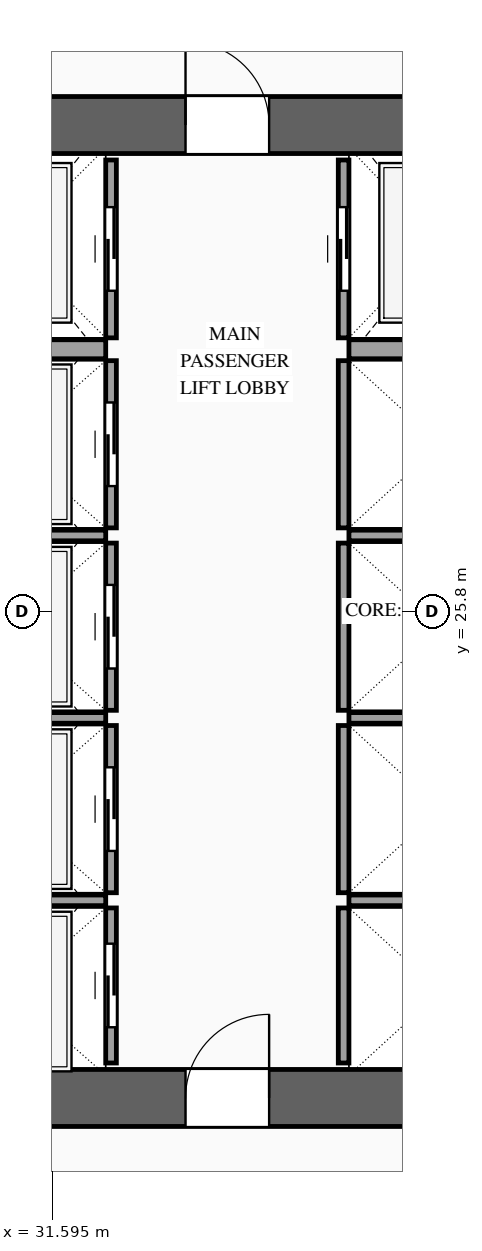
"""IFC4 building model, lengths in metres.
Left out: names, types, materials, properties, quantities, classifications, styles, units other than length and angle.
Written with IfcOpenShell. Run it as: python <this file> out.ifc"""

import sys

from ifc_helpers import new_model, si_unit, direction, frame, frame_2d, origin, place, context, subcontext, project, spatial, rectangle, extrude, source, transform, mapped, element, fill, save


model = new_model("IFC4")
c1 = context("Model", 3, precision=1e-05, world=origin(), true_north=direction((0.0, 1.0)))
c2 = subcontext(c1, "Body", "Model", "MODEL_VIEW")
j1 = project(units=[si_unit("LENGTHUNIT", "METRE"), si_unit("PLANEANGLEUNIT", "RADIAN")], contexts=[c1])
p1 = place(None, origin())
s1 = spatial("IfcSite", under=j1, at=p1, CompositionType="ELEMENT")
p2 = place(p1, origin())
s2 = spatial("IfcBuilding", under=s1, at=p2, CompositionType="ELEMENT")
p3 = place(p2, frame((0.0, 0.0, 126.2)))
s3 = spatial("IfcBuildingStorey", under=s2, at=p3, CompositionType="ELEMENT", Elevation=126.2)
p4 = place(p3, frame((23.425, 19.4, 0.0), z_axis=(0.0, 0.0, 1.0), x_axis=(1.0, 0.0, 0.0)))
e1 = element("IfcWall", 1, at=p4, inside=s3, PredefinedType="SHEAR", context=c2, shape_type="SweptSolid", body=[
    extrude(rectangle(XDim=27.15, YDim=0.75, at=frame_2d((13.575, 0.0))), origin(), (0.0, 0.0, 1.0), 3.6),
])
p5 = place(p4, frame((2.025, 0.0, 0.0)))
e2 = element("IfcOpeningElement", 2, at=p5, cuts=e1, PredefinedType="OPENING", context=c2, shape_type="SweptSolid", body=[
    extrude(rectangle(XDim=1.1, YDim=2.2, at=frame_2d((0.55, 1.1))), frame((0.0, 0.39, 0.0), z_axis=(0.0, -1.0, 0.0), x_axis=(1.0, 0.0, 0.0)), (0.0, 0.0, 1.0), 0.78),
])
p6 = place(p4, frame((9.925, 0.0, 0.0)))
e3 = element("IfcOpeningElement", 3, at=p6, cuts=e1, PredefinedType="OPENING", context=c2, shape_type="SweptSolid", body=[
    extrude(rectangle(XDim=1.1, YDim=2.2, at=frame_2d((0.55, 1.1))), frame((0.0, 0.39, 0.0), z_axis=(0.0, -1.0, 0.0), x_axis=(1.0, 0.0, 0.0)), (0.0, 0.0, 1.0), 0.78),
])
p7 = place(p4, frame((23.125, 0.0, 0.0)))
e4 = element("IfcOpeningElement", 4, at=p7, cuts=e1, PredefinedType="OPENING", context=c2, shape_type="SweptSolid", body=[
    extrude(rectangle(XDim=1.1, YDim=2.2, at=frame_2d((0.55, 1.1))), frame((0.0, 0.39, 0.0), z_axis=(0.0, -1.0, 0.0), x_axis=(1.0, 0.0, 0.0)), (0.0, 0.0, 1.0), 0.78),
])
p8 = place(p4, frame((19.745, 0.0, 0.0)))
e5 = element("IfcOpeningElement", 5, at=p8, cuts=e1, PredefinedType="OPENING", context=c2, shape_type="SweptSolid", body=[
    extrude(rectangle(XDim=0.9, YDim=2.15, at=frame_2d((0.45, 1.075))), frame((0.0, 0.39, 0.0), z_axis=(0.0, -1.0, 0.0), x_axis=(1.0, 0.0, 0.0)), (0.0, 0.0, 1.0), 0.78),
])
p9 = place(p4, frame((18.305, 0.0, 0.0)))
e6 = element("IfcOpeningElement", 6, at=p9, cuts=e1, PredefinedType="OPENING", context=c2, shape_type="SweptSolid", body=[
    extrude(rectangle(XDim=0.9, YDim=2.15, at=frame_2d((0.45, 1.075))), frame((0.0, 0.39, 0.0), z_axis=(0.0, -1.0, 0.0), x_axis=(1.0, 0.0, 0.0)), (0.0, 0.0, 1.0), 0.78),
])
p10 = place(p3, frame((23.425, 32.2, 0.0), z_axis=(0.0, 0.0, 1.0), x_axis=(1.0, 0.0, 0.0)))
e7 = element("IfcWall", 7, at=p10, inside=s3, PredefinedType="SHEAR", context=c2, shape_type="SweptSolid", body=[
    extrude(rectangle(XDim=27.15, YDim=0.75, at=frame_2d((13.575, 0.0))), origin(), (0.0, 0.0, 1.0), 3.6),
])
p11 = place(p10, frame((4.645, 0.0, 0.0)))
e8 = element("IfcOpeningElement", 8, at=p11, cuts=e7, PredefinedType="OPENING", context=c2, shape_type="SweptSolid", body=[
    extrude(rectangle(XDim=0.9, YDim=2.15, at=frame_2d((0.45, 1.075))), frame((0.0, 0.39, 0.0), z_axis=(0.0, -1.0, 0.0), x_axis=(1.0, 0.0, 0.0)), (0.0, 0.0, 1.0), 0.78),
])
p12 = place(p10, frame((9.925, 0.0, 0.0)))
e9 = element("IfcOpeningElement", 9, at=p12, cuts=e7, PredefinedType="OPENING", context=c2, shape_type="SweptSolid", body=[
    extrude(rectangle(XDim=1.1, YDim=2.2, at=frame_2d((0.55, 1.1))), frame((0.0, 0.39, 0.0), z_axis=(0.0, -1.0, 0.0), x_axis=(1.0, 0.0, 0.0)), (0.0, 0.0, 1.0), 0.78),
])
p13 = place(p10, frame((15.775, 0.0, 0.0)))
e10 = element("IfcOpeningElement", 10, at=p13, cuts=e7, PredefinedType="OPENING", context=c2, shape_type="SweptSolid", body=[
    extrude(rectangle(XDim=1.1, YDim=2.2, at=frame_2d((0.55, 1.1))), frame((0.0, 0.39, 0.0), z_axis=(0.0, -1.0, 0.0), x_axis=(1.0, 0.0, 0.0)), (0.0, 0.0, 1.0), 0.78),
])
p14 = place(p3, frame((32.37, 19.86, 0.0), z_axis=(0.0, 0.0, 1.0), x_axis=(0.0, 1.0, 0.0)))
e11 = element("IfcWall", 11, at=p14, inside=s3, PredefinedType="SOLIDWALL", context=c2, shape_type="SweptSolid", body=[
    extrude(rectangle(XDim=2.04, YDim=0.14, at=frame_2d((1.02, 0.0))), origin(), (0.0, 0.0, 1.0), 3.32),
])
p15 = place(p14, frame((0.47, 0.0, 0.0)))
e12 = element("IfcOpeningElement", 12, at=p15, cuts=e11, PredefinedType="OPENING", context=c2, shape_type="SweptSolid", body=[
    extrude(rectangle(XDim=1.1, YDim=2.2, at=frame_2d((0.55, 1.1))), frame((0.0, 0.085, 0.0), z_axis=(0.0, -1.0, 0.0), x_axis=(1.0, 0.0, 0.0)), (0.0, 0.0, 1.0), 0.17),
])
m1 = source(origin(), c2, "Body", "SweptSolid", [
    extrude(rectangle(XDim=2.5, YDim=0.14, at=frame_2d((1.25, 0.0))), origin(), (0.0, 0.0, 1.0), 3.32),
])
p16 = place(p3, frame((29.8, 22.0, 0.0), z_axis=(0.0, 0.0, 1.0), x_axis=(1.0, 0.0, 0.0)))
e13 = element("IfcWall", 13, at=p16, inside=s3, PredefinedType="SOLIDWALL", context=c2, shape_type="MappedRepresentation", body=[
    mapped(m1, transform((0.0, 0.0, 0.0), scale=1.0)),
])
p17 = place(p3, frame((32.37, 22.1, 0.0), z_axis=(0.0, 0.0, 1.0), x_axis=(0.0, 1.0, 0.0)))
e14 = element("IfcWall", 14, at=p17, inside=s3, PredefinedType="SOLIDWALL", context=c2, shape_type="SweptSolid", body=[
    extrude(rectangle(XDim=2.2, YDim=0.14, at=frame_2d((1.1, 0.0))), origin(), (0.0, 0.0, 1.0), 3.32),
])
p18 = place(p17, frame((0.55, 0.0, 0.0)))
e15 = element("IfcOpeningElement", 15, at=p18, cuts=e14, PredefinedType="OPENING", context=c2, shape_type="SweptSolid", body=[
    extrude(rectangle(XDim=1.1, YDim=2.2, at=frame_2d((0.55, 1.1))), frame((0.0, 0.085, 0.0), z_axis=(0.0, -1.0, 0.0), x_axis=(1.0, 0.0, 0.0)), (0.0, 0.0, 1.0), 0.17),
])
p19 = place(p3, frame((29.8, 24.4, 0.0), z_axis=(0.0, 0.0, 1.0), x_axis=(1.0, 0.0, 0.0)))
e16 = element("IfcWall", 16, at=p19, inside=s3, PredefinedType="SOLIDWALL", context=c2, shape_type="MappedRepresentation", body=[
    mapped(m1, transform((0.0, 0.0, 0.0), scale=1.0)),
])
p20 = place(p3, frame((32.37, 24.5, 0.0), z_axis=(0.0, 0.0, 1.0), x_axis=(0.0, 1.0, 0.0)))
e17 = element("IfcWall", 17, at=p20, inside=s3, PredefinedType="SOLIDWALL", context=c2, shape_type="SweptSolid", body=[
    extrude(rectangle(XDim=2.2, YDim=0.14, at=frame_2d((1.1, 0.0))), origin(), (0.0, 0.0, 1.0), 3.32),
])
p21 = place(p20, frame((0.55, 0.0, 0.0)))
e18 = element("IfcOpeningElement", 18, at=p21, cuts=e17, PredefinedType="OPENING", context=c2, shape_type="SweptSolid", body=[
    extrude(rectangle(XDim=1.1, YDim=2.2, at=frame_2d((0.55, 1.1))), frame((0.0, 0.085, 0.0), z_axis=(0.0, -1.0, 0.0), x_axis=(1.0, 0.0, 0.0)), (0.0, 0.0, 1.0), 0.17),
])
p22 = place(p3, frame((29.8, 26.8, 0.0), z_axis=(0.0, 0.0, 1.0), x_axis=(1.0, 0.0, 0.0)))
e19 = element("IfcWall", 19, at=p22, inside=s3, PredefinedType="SOLIDWALL", context=c2, shape_type="MappedRepresentation", body=[
    mapped(m1, transform((0.0, 0.0, 0.0), scale=1.0)),
])
p23 = place(p3, frame((32.37, 26.9, 0.0), z_axis=(0.0, 0.0, 1.0), x_axis=(0.0, 1.0, 0.0)))
e20 = element("IfcWall", 20, at=p23, inside=s3, PredefinedType="SOLIDWALL", context=c2, shape_type="SweptSolid", body=[
    extrude(rectangle(XDim=2.2, YDim=0.14, at=frame_2d((1.1, 0.0))), origin(), (0.0, 0.0, 1.0), 3.32),
])
p24 = place(p23, frame((0.55, 0.0, 0.0)))
e21 = element("IfcOpeningElement", 21, at=p24, cuts=e20, PredefinedType="OPENING", context=c2, shape_type="SweptSolid", body=[
    extrude(rectangle(XDim=1.1, YDim=2.2, at=frame_2d((0.55, 1.1))), frame((0.0, 0.085, 0.0), z_axis=(0.0, -1.0, 0.0), x_axis=(1.0, 0.0, 0.0)), (0.0, 0.0, 1.0), 0.17),
])
p25 = place(p3, frame((32.37, 29.4, 0.0), z_axis=(0.0, 0.0, 1.0), x_axis=(0.0, 1.0, 0.0)))
e22 = element("IfcWall", 22, at=p25, inside=s3, PredefinedType="SOLIDWALL", context=c2, shape_type="SweptSolid", body=[
    extrude(rectangle(XDim=2.34, YDim=0.14, at=frame_2d((1.17, 0.0))), origin(), (0.0, 0.0, 1.0), 3.32),
])
p26 = place(p25, frame((0.62, 0.0, 0.0)))
e23 = element("IfcOpeningElement", 23, at=p26, cuts=e22, PredefinedType="OPENING", context=c2, shape_type="SweptSolid", body=[
    extrude(rectangle(XDim=1.1, YDim=2.2, at=frame_2d((0.55, 1.1))), frame((0.0, 0.085, 0.0), z_axis=(0.0, -1.0, 0.0), x_axis=(1.0, 0.0, 0.0)), (0.0, 0.0, 1.0), 0.17),
])
m2 = source(origin(), c2, "Body", "SweptSolid", [
    extrude(rectangle(XDim=2.5, YDim=0.25, at=frame_2d((1.25, 0.0))), origin(), (0.0, 0.0, 1.0), 3.32),
])
p27 = place(p3, frame((29.8, 29.25, 0.0), z_axis=(0.0, 0.0, 1.0), x_axis=(1.0, 0.0, 0.0)))
e24 = element("IfcWall", 24, at=p27, inside=s3, PredefinedType="SOLIDWALL", context=c2, shape_type="MappedRepresentation", body=[
    mapped(m2, transform((0.0, 0.0, 0.0), scale=1.0)),
])
m3 = source(origin(), c2, "Body", "SweptSolid", [
    extrude(rectangle(XDim=2.04, YDim=0.14, at=frame_2d((1.02, 0.0))), origin(), (0.0, 0.0, 1.0), 3.32),
])
p28 = place(p3, frame((35.43, 19.86, 0.0), z_axis=(0.0, 0.0, 1.0), x_axis=(0.0, 1.0, 0.0)))
e25 = element("IfcWall", 25, at=p28, inside=s3, PredefinedType="SOLIDWALL", context=c2, shape_type="MappedRepresentation", body=[
    mapped(m3, transform((0.0, 0.0, 0.0), scale=1.0)),
])
m4 = source(origin(), c2, "Body", "SweptSolid", [
    extrude(rectangle(XDim=2.4, YDim=0.14, at=frame_2d((1.2, 0.0))), origin(), (0.0, 0.0, 1.0), 3.32),
])
p29 = place(p3, frame((35.5, 22.0, 0.0), z_axis=(0.0, 0.0, 1.0), x_axis=(1.0, 0.0, 0.0)))
e26 = element("IfcWall", 26, at=p29, inside=s3, PredefinedType="SOLIDWALL", context=c2, shape_type="MappedRepresentation", body=[
    mapped(m4, transform((0.0, 0.0, 0.0), scale=1.0)),
])
m5 = source(origin(), c2, "Body", "SweptSolid", [
    extrude(rectangle(XDim=2.2, YDim=0.14, at=frame_2d((1.1, 0.0))), origin(), (0.0, 0.0, 1.0), 3.32),
])
p30 = place(p3, frame((35.43, 22.1, 0.0), z_axis=(0.0, 0.0, 1.0), x_axis=(0.0, 1.0, 0.0)))
e27 = element("IfcWall", 27, at=p30, inside=s3, PredefinedType="SOLIDWALL", context=c2, shape_type="MappedRepresentation", body=[
    mapped(m5, transform((0.0, 0.0, 0.0), scale=1.0)),
])
p31 = place(p3, frame((35.5, 24.4, 0.0), z_axis=(0.0, 0.0, 1.0), x_axis=(1.0, 0.0, 0.0)))
e28 = element("IfcWall", 28, at=p31, inside=s3, PredefinedType="SOLIDWALL", context=c2, shape_type="MappedRepresentation", body=[
    mapped(m4, transform((0.0, 0.0, 0.0), scale=1.0)),
])
p32 = place(p3, frame((35.43, 24.5, 0.0), z_axis=(0.0, 0.0, 1.0), x_axis=(0.0, 1.0, 0.0)))
e29 = element("IfcWall", 29, at=p32, inside=s3, PredefinedType="SOLIDWALL", context=c2, shape_type="MappedRepresentation", body=[
    mapped(m5, transform((0.0, 0.0, 0.0), scale=1.0)),
])
p33 = place(p3, frame((35.5, 26.8, 0.0), z_axis=(0.0, 0.0, 1.0), x_axis=(1.0, 0.0, 0.0)))
e30 = element("IfcWall", 30, at=p33, inside=s3, PredefinedType="SOLIDWALL", context=c2, shape_type="MappedRepresentation", body=[
    mapped(m4, transform((0.0, 0.0, 0.0), scale=1.0)),
])
m6 = source(origin(), c2, "Body", "SweptSolid", [
    extrude(rectangle(XDim=2.2, YDim=0.14, at=frame_2d((1.1, 0.0))), origin(), (0.0, 0.0, 1.0), 3.32),
])
p34 = place(p3, frame((35.43, 26.9, 0.0), z_axis=(0.0, 0.0, 1.0), x_axis=(0.0, 1.0, 0.0)))
e31 = element("IfcWall", 31, at=p34, inside=s3, PredefinedType="SOLIDWALL", context=c2, shape_type="MappedRepresentation", body=[
    mapped(m6, transform((0.0, 0.0, 0.0), scale=1.0)),
])
p35 = place(p3, frame((35.43, 29.4, 0.0), z_axis=(0.0, 0.0, 1.0), x_axis=(0.0, 1.0, 0.0)))
e32 = element("IfcWall", 32, at=p35, inside=s3, PredefinedType="SOLIDWALL", context=c2, shape_type="SweptSolid", body=[
    extrude(rectangle(XDim=2.34, YDim=0.14, at=frame_2d((1.17, 0.0))), origin(), (0.0, 0.0, 1.0), 3.32),
])
p36 = place(p35, frame((0.62, 0.0, 0.0)))
e33 = element("IfcOpeningElement", 33, at=p36, cuts=e32, PredefinedType="OPENING", context=c2, shape_type="SweptSolid", body=[
    extrude(rectangle(XDim=1.1, YDim=2.2, at=frame_2d((0.55, 1.1))), frame((0.0, 0.085, 0.0), z_axis=(0.0, -1.0, 0.0), x_axis=(1.0, 0.0, 0.0)), (0.0, 0.0, 1.0), 0.17),
])
m7 = source(origin(), c2, "Body", "SweptSolid", [
    extrude(rectangle(XDim=2.4, YDim=0.25, at=frame_2d((1.2, 0.0))), origin(), (0.0, 0.0, 1.0), 3.32),
])
p37 = place(p3, frame((35.5, 29.25, 0.0), z_axis=(0.0, 0.0, 1.0), x_axis=(1.0, 0.0, 0.0)))
e34 = element("IfcWall", 34, at=p37, inside=s3, PredefinedType="SOLIDWALL", context=c2, shape_type="MappedRepresentation", body=[
    mapped(m7, transform((0.0, 0.0, 0.0), scale=1.0)),
])
m8 = source(origin(), c2, "Body", "SweptSolid", [
    extrude(rectangle(XDim=1.1, YDim=2.2, at=frame_2d((0.55, 1.1))), frame((0.0, 0.025, 0.0), z_axis=(0.0, -1.0, 0.0), x_axis=(1.0, 0.0, 0.0)), (0.0, 0.0, 1.0), 0.05),
])
p38 = place(p15, origin())
e35 = element("IfcDoor", 35, at=p38, inside=s3, OperationType="SLIDING_TO_LEFT", PredefinedType="DOOR", context=c2, shape_type="MappedRepresentation", body=[
    mapped(m8, transform((0.0, 0.0, 0.0), scale=1.0)),
])
fill(e12, e35)
p39 = place(p18, origin())
e36 = element("IfcDoor", 36, at=p39, inside=s3, OperationType="SLIDING_TO_RIGHT", PredefinedType="DOOR", context=c2, shape_type="MappedRepresentation", body=[
    mapped(m8, transform((0.0, 0.0, 0.0), scale=1.0)),
])
fill(e15, e36)
p40 = place(p21, origin())
e37 = element("IfcDoor", 37, at=p40, inside=s3, OperationType="SLIDING_TO_LEFT", PredefinedType="DOOR", context=c2, shape_type="MappedRepresentation", body=[
    mapped(m8, transform((0.0, 0.0, 0.0), scale=1.0)),
])
fill(e18, e37)
p41 = place(p24, origin())
e38 = element("IfcDoor", 38, at=p41, inside=s3, OperationType="SLIDING_TO_RIGHT", PredefinedType="DOOR", context=c2, shape_type="MappedRepresentation", body=[
    mapped(m8, transform((0.0, 0.0, 0.0), scale=1.0)),
])
fill(e21, e38)
p42 = place(p26, origin())
e39 = element("IfcDoor", 39, at=p42, inside=s3, OperationType="SLIDING_TO_LEFT", PredefinedType="DOOR", context=c2, shape_type="MappedRepresentation", body=[
    mapped(m8, transform((0.0, 0.0, 0.0), scale=1.0)),
])
fill(e23, e39)
p43 = place(p36, origin())
e40 = element("IfcDoor", 40, at=p43, inside=s3, OperationType="SLIDING_TO_RIGHT", PredefinedType="DOOR", context=c2, shape_type="MappedRepresentation", body=[
    mapped(m8, transform((0.0, 0.0, 0.0), scale=1.0)),
])
fill(e33, e40)
m9 = source(origin(), c2, "Body", "SweptSolid", [
    extrude(rectangle(XDim=1.1, YDim=2.2, at=frame_2d((0.55, 1.1))), frame((0.0, 0.025, 0.0), z_axis=(0.0, -1.0, 0.0), x_axis=(1.0, 0.0, 0.0)), (0.0, 0.0, 1.0), 0.05),
])
p44 = place(p6, origin())
e41 = element("IfcDoor", 41, at=p44, inside=s3, OperationType="SINGLE_SWING_RIGHT", PredefinedType="DOOR", context=c2, shape_type="MappedRepresentation", body=[
    mapped(m9, transform((0.0, 0.0, 0.0), scale=1.0)),
])
fill(e3, e41)
p45 = place(p12, origin())
e42 = element("IfcDoor", 42, at=p45, inside=s3, OperationType="SINGLE_SWING_LEFT", PredefinedType="DOOR", context=c2, shape_type="MappedRepresentation", body=[
    mapped(m9, transform((0.0, 0.0, 0.0), scale=1.0)),
])
fill(e9, e42)
save(model, sys.argv[1])
